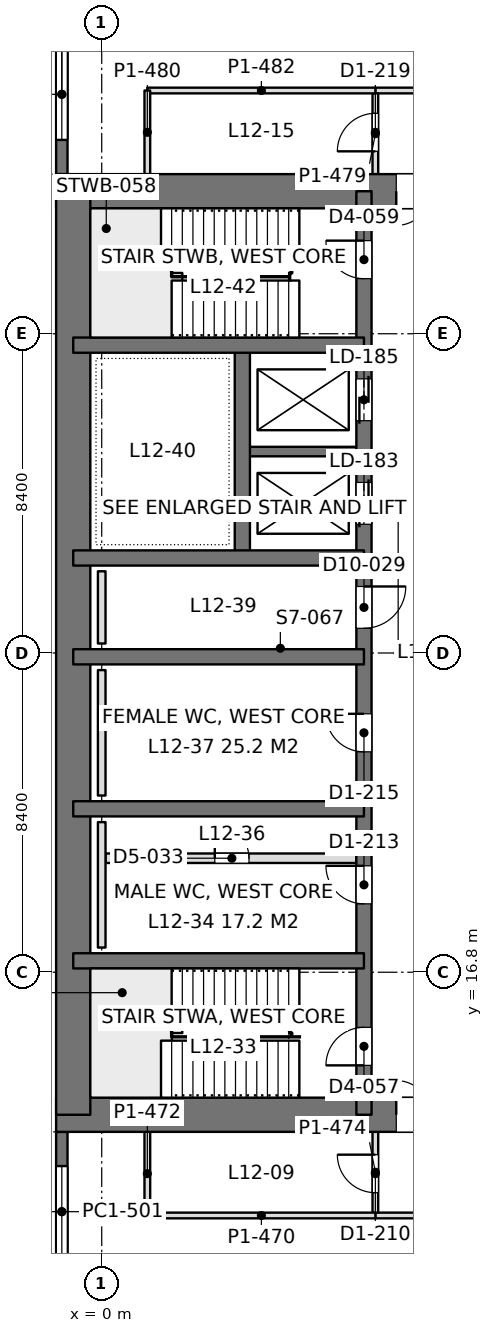
"""IFC4 building model, lengths in metres.
Left out: names, types, materials, properties, quantities, classifications, styles, units other than length and angle.
Written with IfcOpenShell. Run it as: python <this file> out.ifc"""

import sys

from ifc_helpers import new_model, si_unit, direction, frame, frame_2d, origin, place, context, subcontext, project, spatial, rectangle, extrude, element, fill, save


model = new_model("IFC4")
c1 = context("Model", 3, precision=1e-05, world=origin(), true_north=direction((0.0, 1.0)))
c2 = subcontext(c1, "Body", "Model", "MODEL_VIEW")
j1 = project(units=[si_unit("LENGTHUNIT", "METRE"), si_unit("PLANEANGLEUNIT", "RADIAN")], contexts=[c1])
p1 = place(None, origin())
s1 = spatial("IfcSite", under=j1, at=p1, CompositionType="ELEMENT")
p2 = place(p1, origin())
s2 = spatial("IfcBuilding", under=s1, at=p2, CompositionType="ELEMENT")
p3 = place(p2, frame((0.0, 0.0, 54.9)))
s3 = spatial("IfcBuildingStorey", under=s2, at=p3, CompositionType="ELEMENT", Elevation=54.9)
p4 = place(p3, frame((-1.2, 13.05, 0.0), z_axis=(0.0, 0.0, 1.0), x_axis=(1.0, 0.0, 0.0)))
e1 = element("IfcWall", 1, at=p4, inside=s3, PredefinedType="SHEAR", context=c2, shape_type="SweptSolid", body=[
    extrude(rectangle(XDim=18.0, YDim=0.9, at=frame_2d((9.0, 0.0))), origin(), (0.0, 0.0, 1.0), 4.5),
])
p5 = place(p4, frame((8.95, 0.0, 0.0)))
e2 = element("IfcOpeningElement", 2, at=p5, cuts=e1, PredefinedType="OPENING", context=c2, shape_type="SweptSolid", body=[
    extrude(rectangle(XDim=1.8, YDim=2.4, at=frame_2d((0.9, 1.2))), frame((0.0, 0.46, 0.0), z_axis=(0.0, -1.0, 0.0), x_axis=(1.0, 0.0, 0.0)), (0.0, 0.0, 1.0), 0.92),
])
p6 = place(p3, frame((-1.2, 37.35, 0.0), z_axis=(0.0, 0.0, 1.0), x_axis=(1.0, 0.0, 0.0)))
e3 = element("IfcWall", 3, at=p6, inside=s3, PredefinedType="SHEAR", context=c2, shape_type="SweptSolid", body=[
    extrude(rectangle(XDim=18.0, YDim=0.9, at=frame_2d((9.0, 0.0))), origin(), (0.0, 0.0, 1.0), 4.5),
])
p7 = place(p6, frame((8.95, 0.0, 0.0)))
e4 = element("IfcOpeningElement", 4, at=p7, cuts=e3, PredefinedType="OPENING", context=c2, shape_type="SweptSolid", body=[
    extrude(rectangle(XDim=1.8, YDim=2.4, at=frame_2d((0.9, 1.2))), frame((0.0, 0.46, 0.0), z_axis=(0.0, -1.0, 0.0), x_axis=(1.0, 0.0, 0.0)), (0.0, 0.0, 1.0), 0.92),
])
p8 = place(p3, frame((-0.75, 13.05, 0.0), z_axis=(0.0, 0.0, 1.0), x_axis=(0.0, 1.0, 0.0)))
e5 = element("IfcWall", 5, at=p8, inside=s3, PredefinedType="SHEAR", context=c2, shape_type="SweptSolid", body=[
    extrude(rectangle(XDim=24.3, YDim=0.9, at=frame_2d((12.15, 0.0))), origin(), (0.0, 0.0, 1.0), 4.5),
])
p9 = place(p3, frame((6.9, 13.05, 0.0), z_axis=(0.0, 0.0, 1.0), x_axis=(0.0, 1.0, 0.0)))
e6 = element("IfcWall", 6, at=p9, inside=s3, PredefinedType="SHEAR", context=c2, shape_type="SweptSolid", body=[
    extrude(rectangle(XDim=24.3, YDim=0.4, at=frame_2d((12.15, 0.0))), origin(), (0.0, 0.0, 1.0), 4.5),
])
p10 = place(p9, frame((1.3, 0.0, 0.0)))
e7 = element("IfcOpeningElement", 7, at=p10, cuts=e6, PredefinedType="OPENING", context=c2, shape_type="SweptSolid", body=[
    extrude(rectangle(XDim=1.0, YDim=2.2, at=frame_2d((0.5, 1.1))), frame((0.0, 0.21, 0.0), z_axis=(0.0, -1.0, 0.0), x_axis=(1.0, 0.0, 0.0)), (0.0, 0.0, 1.0), 0.42),
])
p11 = place(p9, frame((22.0, 0.0, 0.0)))
e8 = element("IfcOpeningElement", 8, at=p11, cuts=e6, PredefinedType="OPENING", context=c2, shape_type="SweptSolid", body=[
    extrude(rectangle(XDim=1.0, YDim=2.2, at=frame_2d((0.5, 1.1))), frame((0.0, 0.21, 0.0), z_axis=(0.0, -1.0, 0.0), x_axis=(1.0, 0.0, 0.0)), (0.0, 0.0, 1.0), 0.42),
])
p12 = place(p9, frame((5.55, 0.0, 0.0)))
e9 = element("IfcOpeningElement", 9, at=p12, cuts=e6, PredefinedType="OPENING", context=c2, shape_type="SweptSolid", body=[
    extrude(rectangle(XDim=1.0, YDim=2.2, at=frame_2d((0.5, 1.1))), frame((0.0, 0.21, 0.0), z_axis=(0.0, -1.0, 0.0), x_axis=(1.0, 0.0, 0.0)), (0.0, 0.0, 1.0), 0.42),
])
p13 = place(p9, frame((9.55, 0.0, 0.0)))
e10 = element("IfcOpeningElement", 10, at=p13, cuts=e6, PredefinedType="OPENING", context=c2, shape_type="SweptSolid", body=[
    extrude(rectangle(XDim=1.0, YDim=2.2, at=frame_2d((0.5, 1.1))), frame((0.0, 0.21, 0.0), z_axis=(0.0, -1.0, 0.0), x_axis=(1.0, 0.0, 0.0)), (0.0, 0.0, 1.0), 0.42),
])
p14 = place(p9, frame((12.8, 0.0, 0.0)))
e11 = element("IfcOpeningElement", 11, at=p14, cuts=e6, PredefinedType="OPENING", context=c2, shape_type="SweptSolid", body=[
    extrude(rectangle(XDim=1.1, YDim=2.2, at=frame_2d((0.55, 1.1))), frame((0.0, 0.21, 0.0), z_axis=(0.0, -1.0, 0.0), x_axis=(1.0, 0.0, 0.0)), (0.0, 0.0, 1.0), 0.42),
])
p15 = place(p9, frame((15.538, 0.0, 0.0)))
e12 = element("IfcOpeningElement", 12, at=p15, cuts=e6, PredefinedType="OPENING", context=c2, shape_type="SweptSolid", body=[
    extrude(rectangle(XDim=1.1, YDim=2.2, at=frame_2d((0.55, 1.1))), frame((0.0, 0.21, 0.0), z_axis=(0.0, -1.0, 0.0), x_axis=(1.0, 0.0, 0.0)), (0.0, 0.0, 1.0), 0.42),
])
p16 = place(p9, frame((18.262, 0.0, 0.0)))
e13 = element("IfcOpeningElement", 13, at=p16, cuts=e6, PredefinedType="OPENING", context=c2, shape_type="SweptSolid", body=[
    extrude(rectangle(XDim=1.1, YDim=2.2, at=frame_2d((0.55, 1.1))), frame((0.0, 0.21, 0.0), z_axis=(0.0, -1.0, 0.0), x_axis=(1.0, 0.0, 0.0)), (0.0, 0.0, 1.0), 0.42),
])
for number, where, z_axis, x_axis in (
    (14, (-0.75, 17.1, 0.0), (0.0, 0.0, 1.0), (1.0, 0.0, 0.0)),
    (15, (-0.75, 21.1, 0.0), (0.0, 0.0, 1.0), (1.0, 0.0, 0.0)),
    (16, (-0.75, 25.1, 0.0), (0.0, 0.0, 1.0), (1.0, 0.0, 0.0)),
    (17, (-0.75, 27.7, 0.0), (0.0, 0.0, 1.0), (1.0, 0.0, 0.0)),
    (18, (-0.75, 33.3, 0.0), (0.0, 0.0, 1.0), (1.0, 0.0, 0.0)),
):
    element("IfcWall", number, at=place(p3, frame(where, z_axis=z_axis, x_axis=x_axis)), inside=s3, PredefinedType="SHEAR", context=c2, shape_type="SweptSolid", body=[
        extrude(rectangle(XDim=7.65, YDim=0.4, at=frame_2d((3.825, 0.0))), origin(), (0.0, 0.0, 1.0), 4.5),
    ])
p17 = place(p3, frame((3.7, 27.7, 0.0), z_axis=(0.0, 0.0, 1.0), x_axis=(0.0, 1.0, 0.0)))
e19 = element("IfcWall", 19, at=p17, inside=s3, PredefinedType="SHEAR", context=c2, shape_type="SweptSolid", body=[
    extrude(rectangle(XDim=5.6, YDim=0.4, at=frame_2d((2.8, 0.0))), origin(), (0.0, 0.0, 1.0), 4.5),
])
p18 = place(p3, frame((3.7, 30.5, 0.0), z_axis=(0.0, 0.0, 1.0), x_axis=(1.0, 0.0, 0.0)))
e20 = element("IfcWall", 20, at=p18, inside=s3, PredefinedType="SHEAR", context=c2, shape_type="SweptSolid", body=[
    extrude(rectangle(XDim=3.2, YDim=0.25, at=frame_2d((1.6, 0.0))), origin(), (0.0, 0.0, 1.0), 4.5),
])
p19 = place(p3, frame((-1.05, 8.4, 0.0), z_axis=(0.0, 0.0, 1.0), x_axis=(0.0, 1.0, 0.0)))
e21 = element("IfcWall", 21, at=p19, inside=s3, PredefinedType="SOLIDWALL", context=c2, shape_type="SweptSolid", body=[
    extrude(rectangle(XDim=4.2, YDim=0.3, at=frame_2d((2.1, 0.0))), origin(), (0.0, 0.0, 1.0), 4.34),
])
p20 = place(p19, frame((0.9, 0.0, 0.9)))
e22 = element("IfcOpeningElement", 22, at=p20, cuts=e21, PredefinedType="OPENING", context=c2, shape_type="SweptSolid", body=[
    extrude(rectangle(XDim=2.4, YDim=1.9, at=frame_2d((1.2, 0.95))), frame((0.0, 0.16, 0.0), z_axis=(0.0, -1.0, 0.0), x_axis=(1.0, 0.0, 0.0)), (0.0, 0.0, 1.0), 0.32),
])
p21 = place(p3, frame((-1.05, 37.8, 0.0), z_axis=(0.0, 0.0, 1.0), x_axis=(0.0, 1.0, 0.0)))
e23 = element("IfcWall", 23, at=p21, inside=s3, PredefinedType="SOLIDWALL", context=c2, shape_type="SweptSolid", body=[
    extrude(rectangle(XDim=4.2, YDim=0.3, at=frame_2d((2.1, 0.0))), origin(), (0.0, 0.0, 1.0), 4.34),
])
p22 = place(p21, frame((0.9, 0.0, 0.9)))
e24 = element("IfcOpeningElement", 24, at=p22, cuts=e23, PredefinedType="OPENING", context=c2, shape_type="SweptSolid", body=[
    extrude(rectangle(XDim=2.4, YDim=1.9, at=frame_2d((1.2, 0.95))), frame((0.0, 0.16, 0.0), z_axis=(0.0, -1.0, 0.0), x_axis=(1.0, 0.0, 0.0)), (0.0, 0.0, 1.0), 0.32),
])
p23 = place(p3, frame((7.198, 10.4, 0.0), z_axis=(0.0, 0.0, 1.0), x_axis=(1.0, 0.0, 0.0)))
e25 = element("IfcWall", 25, at=p23, inside=s3, PredefinedType="PARTITIONING", context=c2, shape_type="SweptSolid", body=[
    extrude(rectangle(XDim=42.002, YDim=0.15, at=frame_2d((21.001, 0.0))), origin(), (0.0, 0.0, 1.0), 3.74),
])
p24 = place(p23, frame((4.502, 0.0, 0.0)))
e26 = element("IfcOpeningElement", 26, at=p24, cuts=e25, PredefinedType="OPENING", context=c2, shape_type="SweptSolid", body=[
    extrude(rectangle(XDim=1.8, YDim=2.2, at=frame_2d((0.9, 1.1))), frame((0.0, 0.085, 0.0), z_axis=(0.0, -1.0, 0.0), x_axis=(1.0, 0.0, 0.0)), (0.0, 0.0, 1.0), 0.17),
])
p25 = place(p23, frame((12.902, 0.0, 0.0)))
e27 = element("IfcOpeningElement", 27, at=p25, cuts=e25, PredefinedType="OPENING", context=c2, shape_type="SweptSolid", body=[
    extrude(rectangle(XDim=1.8, YDim=2.2, at=frame_2d((0.9, 1.1))), frame((0.0, 0.085, 0.0), z_axis=(0.0, -1.0, 0.0), x_axis=(1.0, 0.0, 0.0)), (0.0, 0.0, 1.0), 0.17),
])
p26 = place(p23, frame((21.302, 0.0, 0.0)))
e28 = element("IfcOpeningElement", 28, at=p26, cuts=e25, PredefinedType="OPENING", context=c2, shape_type="SweptSolid", body=[
    extrude(rectangle(XDim=1.8, YDim=2.2, at=frame_2d((0.9, 1.1))), frame((0.0, 0.085, 0.0), z_axis=(0.0, -1.0, 0.0), x_axis=(1.0, 0.0, 0.0)), (0.0, 0.0, 1.0), 0.17),
])
p27 = place(p23, frame((29.702, 0.0, 0.0)))
e29 = element("IfcOpeningElement", 29, at=p27, cuts=e25, PredefinedType="OPENING", context=c2, shape_type="SweptSolid", body=[
    extrude(rectangle(XDim=1.8, YDim=2.2, at=frame_2d((0.9, 1.1))), frame((0.0, 0.085, 0.0), z_axis=(0.0, -1.0, 0.0), x_axis=(1.0, 0.0, 0.0)), (0.0, 0.0, 1.0), 0.17),
])
p28 = place(p23, frame((38.102, 0.0, 0.0)))
e30 = element("IfcOpeningElement", 30, at=p28, cuts=e25, PredefinedType="OPENING", context=c2, shape_type="SweptSolid", body=[
    extrude(rectangle(XDim=1.8, YDim=2.2, at=frame_2d((0.9, 1.1))), frame((0.0, 0.085, 0.0), z_axis=(0.0, -1.0, 0.0), x_axis=(1.0, 0.0, 0.0)), (0.0, 0.0, 1.0), 0.17),
])
p29 = place(p3, frame((7.2, 10.474, 0.0), z_axis=(0.0, 0.0, 1.0), x_axis=(0.0, 1.0, 0.0)))
e31 = element("IfcWall", 31, at=p29, inside=s3, PredefinedType="PARTITIONING", context=c2, shape_type="SweptSolid", body=[
    extrude(rectangle(XDim=2.128, YDim=0.15, at=frame_2d((1.064, 0.0))), origin(), (0.0, 0.0, 1.0), 4.34),
])
p30 = place(p29, frame((0.526, 0.0, 0.0)))
e32 = element("IfcOpeningElement", 32, at=p30, cuts=e31, PredefinedType="OPENING", context=c2, shape_type="SweptSolid", body=[
    extrude(rectangle(XDim=1.0, YDim=2.2, at=frame_2d((0.5, 1.1))), frame((0.0, 0.085, 0.0), z_axis=(0.0, -1.0, 0.0), x_axis=(1.0, 0.0, 0.0)), (0.0, 0.0, 1.0), 0.17),
])
p31 = place(p3, frame((1.2, 10.4, 0.0), z_axis=(0.0, 0.0, 1.0), x_axis=(1.0, 0.0, 0.0)))
e33 = element("IfcWall", 33, at=p31, inside=s3, PredefinedType="PARTITIONING", context=c2, shape_type="SweptSolid", body=[
    extrude(rectangle(XDim=6.002, YDim=0.15, at=frame_2d((3.001, 0.0))), origin(), (0.0, 0.0, 1.0), 4.34),
])
p32 = place(p3, frame((1.2, 10.4, 0.0), z_axis=(0.0, 0.0, 1.0), x_axis=(0.0, 1.0, 0.0)))
e34 = element("IfcWall", 34, at=p32, inside=s3, PredefinedType="PARTITIONING", context=c2, shape_type="SweptSolid", body=[
    extrude(rectangle(XDim=2.202, YDim=0.15, at=frame_2d((1.101, 0.0))), origin(), (0.0, 0.0, 1.0), 4.34),
])
p33 = place(p3, frame((7.198, 40.0, 0.0), z_axis=(0.0, 0.0, 1.0), x_axis=(1.0, 0.0, 0.0)))
e35 = element("IfcWall", 35, at=p33, inside=s3, PredefinedType="PARTITIONING", context=c2, shape_type="SweptSolid", body=[
    extrude(rectangle(XDim=42.002, YDim=0.15, at=frame_2d((21.001, 0.0))), origin(), (0.0, 0.0, 1.0), 3.74),
])
p34 = place(p33, frame((4.502, 0.0, 0.0)))
e36 = element("IfcOpeningElement", 36, at=p34, cuts=e35, PredefinedType="OPENING", context=c2, shape_type="SweptSolid", body=[
    extrude(rectangle(XDim=1.8, YDim=2.2, at=frame_2d((0.9, 1.1))), frame((0.0, 0.085, 0.0), z_axis=(0.0, -1.0, 0.0), x_axis=(1.0, 0.0, 0.0)), (0.0, 0.0, 1.0), 0.17),
])
p35 = place(p33, frame((12.902, 0.0, 0.0)))
e37 = element("IfcOpeningElement", 37, at=p35, cuts=e35, PredefinedType="OPENING", context=c2, shape_type="SweptSolid", body=[
    extrude(rectangle(XDim=1.8, YDim=2.2, at=frame_2d((0.9, 1.1))), frame((0.0, 0.085, 0.0), z_axis=(0.0, -1.0, 0.0), x_axis=(1.0, 0.0, 0.0)), (0.0, 0.0, 1.0), 0.17),
])
p36 = place(p33, frame((21.302, 0.0, 0.0)))
e38 = element("IfcOpeningElement", 38, at=p36, cuts=e35, PredefinedType="OPENING", context=c2, shape_type="SweptSolid", body=[
    extrude(rectangle(XDim=1.8, YDim=2.2, at=frame_2d((0.9, 1.1))), frame((0.0, 0.085, 0.0), z_axis=(0.0, -1.0, 0.0), x_axis=(1.0, 0.0, 0.0)), (0.0, 0.0, 1.0), 0.17),
])
p37 = place(p33, frame((29.702, 0.0, 0.0)))
e39 = element("IfcOpeningElement", 39, at=p37, cuts=e35, PredefinedType="OPENING", context=c2, shape_type="SweptSolid", body=[
    extrude(rectangle(XDim=1.8, YDim=2.2, at=frame_2d((0.9, 1.1))), frame((0.0, 0.085, 0.0), z_axis=(0.0, -1.0, 0.0), x_axis=(1.0, 0.0, 0.0)), (0.0, 0.0, 1.0), 0.17),
])
p38 = place(p33, frame((38.102, 0.0, 0.0)))
e40 = element("IfcOpeningElement", 40, at=p38, cuts=e35, PredefinedType="OPENING", context=c2, shape_type="SweptSolid", body=[
    extrude(rectangle(XDim=1.8, YDim=2.2, at=frame_2d((0.9, 1.1))), frame((0.0, 0.085, 0.0), z_axis=(0.0, -1.0, 0.0), x_axis=(1.0, 0.0, 0.0)), (0.0, 0.0, 1.0), 0.17),
])
p39 = place(p3, frame((7.2, 37.8, 0.0), z_axis=(0.0, 0.0, 1.0), x_axis=(0.0, 1.0, 0.0)))
e41 = element("IfcWall", 41, at=p39, inside=s3, PredefinedType="PARTITIONING", context=c2, shape_type="SweptSolid", body=[
    extrude(rectangle(XDim=2.126, YDim=0.15, at=frame_2d((1.063, 0.0))), origin(), (0.0, 0.0, 1.0), 4.34),
])
p40 = place(p39, frame((0.6, 0.0, 0.0)))
e42 = element("IfcOpeningElement", 42, at=p40, cuts=e41, PredefinedType="OPENING", context=c2, shape_type="SweptSolid", body=[
    extrude(rectangle(XDim=1.0, YDim=2.2, at=frame_2d((0.5, 1.1))), frame((0.0, 0.085, 0.0), z_axis=(0.0, -1.0, 0.0), x_axis=(1.0, 0.0, 0.0)), (0.0, 0.0, 1.0), 0.17),
])
p41 = place(p3, frame((1.2, 40.0, 0.0), z_axis=(0.0, 0.0, 1.0), x_axis=(1.0, 0.0, 0.0)))
e43 = element("IfcWall", 43, at=p41, inside=s3, PredefinedType="PARTITIONING", context=c2, shape_type="SweptSolid", body=[
    extrude(rectangle(XDim=6.002, YDim=0.15, at=frame_2d((3.001, 0.0))), origin(), (0.0, 0.0, 1.0), 3.98),
])
p42 = place(p3, frame((1.2, 37.8, 0.0), z_axis=(0.0, 0.0, 1.0), x_axis=(0.0, 1.0, 0.0)))
e44 = element("IfcWall", 44, at=p42, inside=s3, PredefinedType="PARTITIONING", context=c2, shape_type="SweptSolid", body=[
    extrude(rectangle(XDim=2.2, YDim=0.15, at=frame_2d((1.1, 0.0))), origin(), (0.0, 0.0, 1.0), 4.34),
])
p43 = place(p3, frame((0.1, 19.8, 0.0), z_axis=(0.0, 0.0, 1.0), x_axis=(1.0, 0.0, 0.0)))
e45 = element("IfcWall", 45, at=p43, inside=s3, PredefinedType="PARTITIONING", context=c2, shape_type="SweptSolid", body=[
    extrude(rectangle(XDim=6.6, YDim=0.25, at=frame_2d((3.3, 0.0))), origin(), (0.0, 0.0, 1.0), 4.3),
])
p44 = place(p43, frame((2.875, 0.0, 0.0)))
e46 = element("IfcOpeningElement", 46, at=p44, cuts=e45, PredefinedType="OPENING", context=c2, shape_type="SweptSolid", body=[
    extrude(rectangle(XDim=0.9, YDim=2.2, at=frame_2d((0.45, 1.1))), frame((0.0, 0.135, 0.0), z_axis=(0.0, -1.0, 0.0), x_axis=(1.0, 0.0, 0.0)), (0.0, 0.0, 1.0), 0.27),
])
for number, where, z_axis, x_axis in (
    (47, (0.0, 17.45, 0.0), (0.0, 0.0, 1.0), (0.0, 1.0, 0.0)),
    (48, (0.0, 21.45, 0.0), (0.0, 0.0, 1.0), (0.0, 1.0, 0.0)),
):
    element("IfcWall", number, at=place(p3, frame(where, z_axis=z_axis, x_axis=x_axis)), inside=s3, PredefinedType="PLUMBINGWALL", context=c2, shape_type="SweptSolid", body=[
        extrude(rectangle(XDim=3.3, YDim=0.2, at=frame_2d((1.65, 0.0))), origin(), (0.0, 0.0, 1.0), 1.2),
    ])
p45 = place(p3, frame((0.0, 25.45, 0.0), z_axis=(0.0, 0.0, 1.0), x_axis=(0.0, 1.0, 0.0)))
e49 = element("IfcWall", 49, at=p45, inside=s3, PredefinedType="PLUMBINGWALL", context=c2, shape_type="SweptSolid", body=[
    extrude(rectangle(XDim=1.9, YDim=0.2, at=frame_2d((0.95, 0.0))), origin(), (0.0, 0.0, 1.0), 1.2),
])
p46 = place(p20, origin())
e50 = element("IfcWindow", 50, at=p46, inside=s3, PartitioningType="SINGLE_PANEL", PredefinedType="WINDOW", context=c2, shape_type="SweptSolid", body=[
    extrude(rectangle(XDim=2.4, YDim=1.9, at=frame_2d((1.2, 0.95))), frame((0.0, 0.03, 0.0), z_axis=(0.0, -1.0, 0.0), x_axis=(1.0, 0.0, 0.0)), (0.0, 0.0, 1.0), 0.06),
])
fill(e22, e50)
p47 = place(p22, origin())
e51 = element("IfcWindow", 51, at=p47, inside=s3, PartitioningType="SINGLE_PANEL", PredefinedType="WINDOW", context=c2, shape_type="SweptSolid", body=[
    extrude(rectangle(XDim=2.4, YDim=1.9, at=frame_2d((1.2, 0.95))), frame((0.0, 0.03, 0.0), z_axis=(0.0, -1.0, 0.0), x_axis=(1.0, 0.0, 0.0)), (0.0, 0.0, 1.0), 0.06),
])
fill(e24, e51)
p48 = place(p5, origin())
e52 = element("IfcDoor", 52, at=p48, inside=s3, OperationType="DOUBLE_DOOR_SINGLE_SWING", PredefinedType="DOOR", context=c2, shape_type="SweptSolid", body=[
    extrude(rectangle(XDim=1.8, YDim=2.4, at=frame_2d((0.9, 1.2))), frame((0.0, 0.025, 0.0), z_axis=(0.0, -1.0, 0.0), x_axis=(1.0, 0.0, 0.0)), (0.0, 0.0, 1.0), 0.05),
])
fill(e2, e52)
p49 = place(p7, frame((1.8, 0.0, 0.0), z_axis=(0.0, 0.0, 1.0), x_axis=(-1.0, 0.0, 0.0)))
e53 = element("IfcDoor", 53, at=p49, inside=s3, OperationType="DOUBLE_DOOR_SINGLE_SWING", PredefinedType="DOOR", context=c2, shape_type="SweptSolid", body=[
    extrude(rectangle(XDim=1.8, YDim=2.4, at=frame_2d((0.9, 1.2))), frame((0.0, 0.025, 0.0), z_axis=(0.0, -1.0, 0.0), x_axis=(1.0, 0.0, 0.0)), (0.0, 0.0, 1.0), 0.05),
])
fill(e4, e53)
p50 = place(p10, origin())
e54 = element("IfcDoor", 54, at=p50, inside=s3, OperationType="SINGLE_SWING_LEFT", PredefinedType="DOOR", context=c2, shape_type="SweptSolid", body=[
    extrude(rectangle(XDim=1.0, YDim=2.2, at=frame_2d((0.5, 1.1))), frame((0.0, 0.025, 0.0), z_axis=(0.0, -1.0, 0.0), x_axis=(1.0, 0.0, 0.0)), (0.0, 0.0, 1.0), 0.05),
])
fill(e7, e54)
p51 = place(p11, origin())
e55 = element("IfcDoor", 55, at=p51, inside=s3, OperationType="SINGLE_SWING_RIGHT", PredefinedType="DOOR", context=c2, shape_type="SweptSolid", body=[
    extrude(rectangle(XDim=1.0, YDim=2.2, at=frame_2d((0.5, 1.1))), frame((0.0, 0.025, 0.0), z_axis=(0.0, -1.0, 0.0), x_axis=(1.0, 0.0, 0.0)), (0.0, 0.0, 1.0), 0.05),
])
fill(e8, e55)
p52 = place(p12, origin())
e56 = element("IfcDoor", 56, at=p52, inside=s3, OperationType="SINGLE_SWING_RIGHT", PredefinedType="DOOR", context=c2, shape_type="SweptSolid", body=[
    extrude(rectangle(XDim=1.0, YDim=2.2, at=frame_2d((0.5, 1.1))), frame((0.0, 0.025, 0.0), z_axis=(0.0, -1.0, 0.0), x_axis=(1.0, 0.0, 0.0)), (0.0, 0.0, 1.0), 0.05),
])
fill(e9, e56)
p53 = place(p13, origin())
e57 = element("IfcDoor", 57, at=p53, inside=s3, OperationType="SINGLE_SWING_RIGHT", PredefinedType="DOOR", context=c2, shape_type="SweptSolid", body=[
    extrude(rectangle(XDim=1.0, YDim=2.2, at=frame_2d((0.5, 1.1))), frame((0.0, 0.025, 0.0), z_axis=(0.0, -1.0, 0.0), x_axis=(1.0, 0.0, 0.0)), (0.0, 0.0, 1.0), 0.05),
])
fill(e10, e57)
p54 = place(p14, frame((1.1, 0.0, 0.0), z_axis=(0.0, 0.0, 1.0), x_axis=(-1.0, 0.0, 0.0)))
e58 = element("IfcDoor", 58, at=p54, inside=s3, OperationType="SINGLE_SWING_LEFT", PredefinedType="DOOR", context=c2, shape_type="SweptSolid", body=[
    extrude(rectangle(XDim=1.1, YDim=2.2, at=frame_2d((0.55, 1.1))), frame((0.0, 0.025, 0.0), z_axis=(0.0, -1.0, 0.0), x_axis=(1.0, 0.0, 0.0)), (0.0, 0.0, 1.0), 0.05),
])
fill(e11, e58)
p55 = place(p15, origin())
e59 = element("IfcDoor", 59, at=p55, inside=s3, OperationType="DOUBLE_DOOR_SLIDING", PredefinedType="DOOR", context=c2, shape_type="SweptSolid", body=[
    extrude(rectangle(XDim=1.1, YDim=2.2, at=frame_2d((0.55, 1.1))), frame((0.0, 0.025, 0.0), z_axis=(0.0, -1.0, 0.0), x_axis=(1.0, 0.0, 0.0)), (0.0, 0.0, 1.0), 0.05),
])
fill(e12, e59)
p56 = place(p16, origin())
e60 = element("IfcDoor", 60, at=p56, inside=s3, OperationType="DOUBLE_DOOR_SLIDING", PredefinedType="DOOR", context=c2, shape_type="SweptSolid", body=[
    extrude(rectangle(XDim=1.1, YDim=2.2, at=frame_2d((0.55, 1.1))), frame((0.0, 0.025, 0.0), z_axis=(0.0, -1.0, 0.0), x_axis=(1.0, 0.0, 0.0)), (0.0, 0.0, 1.0), 0.05),
])
fill(e13, e60)
p57 = place(p30, origin())
e61 = element("IfcDoor", 61, at=p57, inside=s3, OperationType="SINGLE_SWING_RIGHT", PredefinedType="DOOR", context=c2, shape_type="SweptSolid", body=[
    extrude(rectangle(XDim=1.0, YDim=2.2, at=frame_2d((0.5, 1.1))), frame((0.0, 0.025, 0.0), z_axis=(0.0, -1.0, 0.0), x_axis=(1.0, 0.0, 0.0)), (0.0, 0.0, 1.0), 0.05),
])
fill(e32, e61)
p58 = place(p40, origin())
e62 = element("IfcDoor", 62, at=p58, inside=s3, OperationType="SINGLE_SWING_LEFT", PredefinedType="DOOR", context=c2, shape_type="SweptSolid", body=[
    extrude(rectangle(XDim=1.0, YDim=2.2, at=frame_2d((0.5, 1.1))), frame((0.0, 0.025, 0.0), z_axis=(0.0, -1.0, 0.0), x_axis=(1.0, 0.0, 0.0)), (0.0, 0.0, 1.0), 0.05),
])
fill(e42, e62)
p59 = place(p44, origin())
e63 = element("IfcDoor", 63, at=p59, inside=s3, OperationType="SINGLE_SWING_LEFT", PredefinedType="DOOR", context=c2, shape_type="SweptSolid", body=[
    extrude(rectangle(XDim=0.9, YDim=2.2, at=frame_2d((0.45, 1.1))), frame((0.0, 0.025, 0.0), z_axis=(0.0, -1.0, 0.0), x_axis=(1.0, 0.0, 0.0)), (0.0, 0.0, 1.0), 0.05),
])
fill(e46, e63)
save(model, sys.argv[1])
